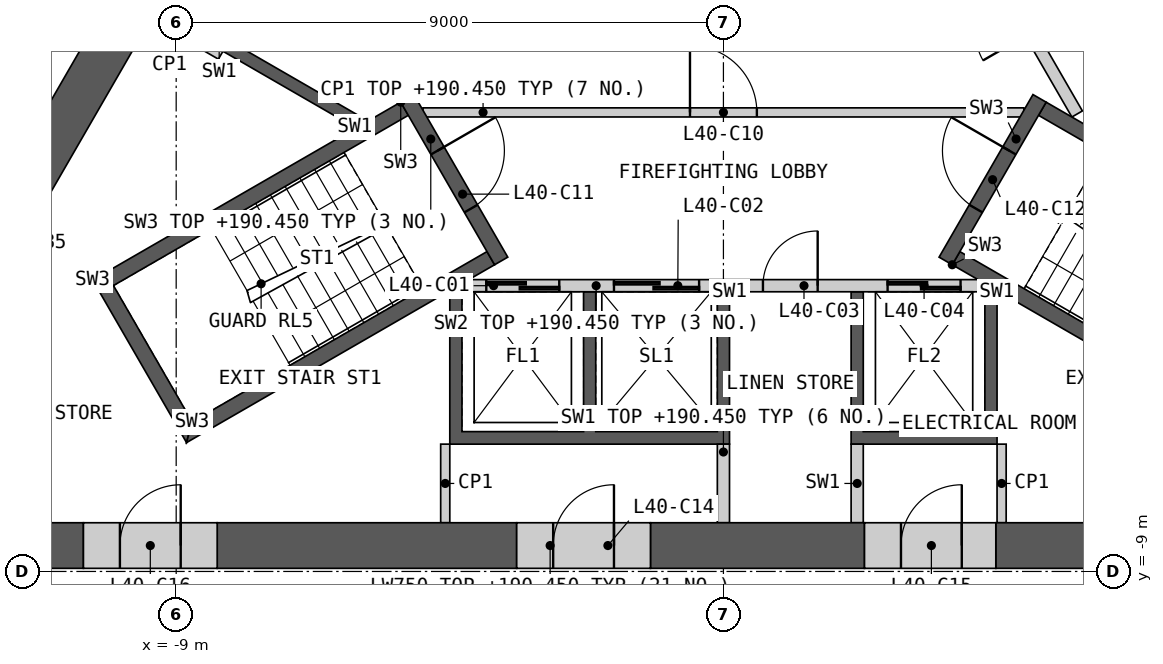
"""IFC4 building model, lengths in metres.
Left out: names, types, materials, properties, quantities, classifications, styles, units other than length and angle.
Written with IfcOpenShell. Run it as: python <this file> out.ifc"""

import sys

from ifc_helpers import new_model, si_unit, direction, frame, frame_2d, origin, place, context, subcontext, project, spatial, polyline, rectangle, outline, extrude, element, fill, save


model = new_model("IFC4")
c1 = context("Model", 3, precision=1e-05, world=origin(), true_north=direction((0.0, 1.0)))
c2 = subcontext(c1, "Body", "Model", "MODEL_VIEW")
j1 = project(units=[si_unit("LENGTHUNIT", "METRE"), si_unit("PLANEANGLEUNIT", "RADIAN")], contexts=[c1])
p1 = place(None, origin())
s1 = spatial("IfcSite", under=j1, at=p1, CompositionType="ELEMENT")
p2 = place(p1, origin())
s2 = spatial("IfcBuilding", under=s1, at=p2, CompositionType="ELEMENT")
p3 = place(p2, frame((0.0, 0.0, 187.2)))
s3 = spatial("IfcBuildingStorey", under=s2, at=p3, CompositionType="ELEMENT", Elevation=187.2)
p4 = place(p3, origin())
e1 = element("IfcWall", 1, at=p4, inside=s3, PredefinedType="SHEAR", context=c2, shape_type="SweptSolid", body=[
    extrude(outline(polyline([(4.5, -4.4), (4.5, -6.906), (2.1, -6.906), (2.1, -4.4), (2.3, -4.4), (2.3, -6.7), (4.3, -6.7), (4.3, -4.4), (4.5, -4.4)])), origin(), (0.0, 0.0, 1.0), 3.25),
])
p5 = place(p3, origin())
e2 = element("IfcWall", 2, at=p5, inside=s3, PredefinedType="SHEAR", context=c2, shape_type="SweptSolid", body=[
    extrude(outline(polyline([(0.1, -4.4), (0.1, -6.906), (-4.5, -6.906), (-4.5, -4.4), (-4.3, -4.4), (-4.3, -6.7), (-2.3, -6.7), (-2.3, -4.4), (-2.1, -4.4), (-2.1, -6.7), (-0.1, -6.7), (-0.1, -4.4), (0.1, -4.4)])), origin(), (0.0, 0.0, 1.0), 3.25),
])
p6 = place(p3, frame((-4.187, -4.3, 0.0), z_axis=(0.0, 0.0, 1.0), x_axis=(1.0, 0.0, 0.0)))
e3 = element("IfcWall", 3, at=p6, inside=s3, PredefinedType="SOLIDWALL", context=c2, shape_type="SweptSolid", body=[
    extrude(rectangle(XDim=8.373, YDim=0.2, at=frame_2d((4.187, 0.0))), origin(), (0.0, 0.0, 1.0), 3.25),
])
p7 = place(p6, frame((0.287, 0.0, 0.0)))
e4 = element("IfcOpeningElement", 4, at=p7, cuts=e3, PredefinedType="OPENING", context=c2, shape_type="SweptSolid", body=[
    extrude(rectangle(XDim=1.2, YDim=2.1, at=frame_2d((0.6, 1.05))), frame((0.0, 0.11, 0.0), z_axis=(0.0, -1.0, 0.0), x_axis=(1.0, 0.0, 0.0)), (0.0, 0.0, 1.0), 0.22),
])
p8 = place(p6, frame((2.387, 0.0, 0.0)))
e5 = element("IfcOpeningElement", 5, at=p8, cuts=e3, PredefinedType="OPENING", context=c2, shape_type="SweptSolid", body=[
    extrude(rectangle(XDim=1.4, YDim=2.1, at=frame_2d((0.7, 1.05))), frame((0.0, 0.11, 0.0), z_axis=(0.0, -1.0, 0.0), x_axis=(1.0, 0.0, 0.0)), (0.0, 0.0, 1.0), 0.22),
])
p9 = place(p6, frame((4.837, 0.0, 0.0)))
e6 = element("IfcOpeningElement", 6, at=p9, cuts=e3, PredefinedType="OPENING", context=c2, shape_type="SweptSolid", body=[
    extrude(rectangle(XDim=0.9, YDim=2.1, at=frame_2d((0.45, 1.05))), frame((0.0, 0.11, 0.0), z_axis=(0.0, -1.0, 0.0), x_axis=(1.0, 0.0, 0.0)), (0.0, 0.0, 1.0), 0.22),
])
p10 = place(p6, frame((6.887, 0.0, 0.0)))
e7 = element("IfcOpeningElement", 7, at=p10, cuts=e3, PredefinedType="OPENING", context=c2, shape_type="SweptSolid", body=[
    extrude(rectangle(XDim=1.2, YDim=2.1, at=frame_2d((0.6, 1.05))), frame((0.0, 0.11, 0.0), z_axis=(0.0, -1.0, 0.0), x_axis=(1.0, 0.0, 0.0)), (0.0, 0.0, 1.0), 0.22),
])
for number, where, z_axis, x_axis in (
    (8, (0.0, -6.906, 0.0), (0.0, 0.0, 1.0), (0.0, -1.0, 0.0)),
    (9, (2.2, -6.906, 0.0), (0.0, 0.0, 1.0), (0.0, -1.0, 0.0)),
):
    element("IfcWall", number, at=place(p3, frame(where, z_axis=z_axis, x_axis=x_axis)), inside=s3, PredefinedType="SHEAR", context=c2, shape_type="SweptSolid", body=[
        extrude(rectangle(XDim=1.293, YDim=0.2, at=frame_2d((0.646, 0.0))), origin(), (0.0, 0.0, 1.0), 3.25),
    ])
p11 = place(p3, origin())
e10 = element("IfcWall", 10, at=p11, inside=s3, PredefinedType="SHEAR", context=c2, shape_type="SweptSolid", body=[
    extrude(outline(polyline([(3.76, 2.287), (5.931, 3.54), (8.231, -0.444), (6.061, -1.697), (5.96, -1.524), (7.952, -0.374), (5.852, 3.263), (3.861, 2.113), (3.76, 2.287)])), origin(), (0.0, 0.0, 1.0), 3.25),
])
p12 = place(p3, frame((5.817, -1.476, 0.0), z_axis=(0.0, 0.0, 1.0), x_axis=(-0.500002616675, 0.866023893041, 0.0)))
e11 = element("IfcWall", 11, at=p12, inside=s3, PredefinedType="SOLIDWALL", context=c2, shape_type="SweptSolid", body=[
    extrude(rectangle(XDim=8.373, YDim=0.2, at=frame_2d((4.187, 0.0))), origin(), (0.0, 0.0, 1.0), 3.25),
])
p13 = place(p12, frame((1.537, 0.0, 0.0)))
e12 = element("IfcOpeningElement", 12, at=p13, cuts=e11, PredefinedType="OPENING", context=c2, shape_type="SweptSolid", body=[
    extrude(rectangle(XDim=0.9, YDim=2.1, at=frame_2d((0.45, 1.05))), frame((0.0, 0.11, 0.0), z_axis=(0.0, -1.0, 0.0), x_axis=(1.0, 0.0, 0.0)), (0.0, 0.0, 1.0), 0.22),
])
p14 = place(p12, frame((4.837, 0.0, 0.0)))
e13 = element("IfcOpeningElement", 13, at=p14, cuts=e11, PredefinedType="OPENING", context=c2, shape_type="SweptSolid", body=[
    extrude(rectangle(XDim=0.9, YDim=2.1, at=frame_2d((0.45, 1.05))), frame((0.0, 0.11, 0.0), z_axis=(0.0, -1.0, 0.0), x_axis=(1.0, 0.0, 0.0)), (0.0, 0.0, 1.0), 0.22),
])
p15 = place(p12, frame((6.937, 0.0, 0.0)))
e14 = element("IfcOpeningElement", 14, at=p15, cuts=e11, PredefinedType="OPENING", context=c2, shape_type="SweptSolid", body=[
    extrude(rectangle(XDim=1.1, YDim=2.1, at=frame_2d((0.55, 1.05))), frame((0.0, 0.11, 0.0), z_axis=(0.0, -1.0, 0.0), x_axis=(1.0, 0.0, 0.0)), (0.0, 0.0, 1.0), 0.22),
])
p16 = place(p3, origin())
e15 = element("IfcWall", 15, at=p16, inside=s3, PredefinedType="SHEAR", context=c2, shape_type="SweptSolid", body=[
    extrude(outline(polyline([(-6.061, -1.697), (-8.231, -0.444), (-8.131, -0.271), (-5.96, -1.524), (-6.061, -1.697)])), origin(), (0.0, 0.0, 1.0), 3.25),
])
p17 = place(p3, frame((-4.941, -1.45, 0.0), z_axis=(0.0, 0.0, 1.0), x_axis=(1.0, 0.0, 0.0)))
e16 = element("IfcWall", 16, at=p17, inside=s3, PredefinedType="PARTITIONING", context=c2, shape_type="SweptSolid", body=[
    extrude(rectangle(XDim=9.882, YDim=0.15, at=frame_2d((4.941, 0.0))), origin(), (0.0, 0.0, 1.0), 3.25),
])
p18 = place(p17, frame((4.391, 0.0, 0.0)))
e17 = element("IfcOpeningElement", 17, at=p18, cuts=e16, PredefinedType="OPENING", context=c2, shape_type="SweptSolid", body=[
    extrude(rectangle(XDim=1.1, YDim=2.1, at=frame_2d((0.55, 1.05))), frame((0.0, 0.085, 0.0), z_axis=(0.0, -1.0, 0.0), x_axis=(1.0, 0.0, 0.0)), (0.0, 0.0, 1.0), 0.17),
])
p19 = place(p3, origin())
e18 = element("IfcWall", 18, at=p19, inside=s3, PredefinedType="SHEAR", context=c2, shape_type="SweptSolid", body=[
    extrude(outline(polyline([(-5.307, -1.281), (-10.374, -4.206), (-10.032, -4.298), (-5.182, -1.498), (-5.307, -1.281)])), origin(), (0.0, 0.0, 1.0), 3.25),
])
p20 = place(p3, origin())
e19 = element("IfcWall", 19, at=p20, inside=s3, PredefinedType="SHEAR", context=c2, shape_type="SweptSolid", body=[
    extrude(outline(polyline([(-10.374, -4.206), (-8.83, -6.881), (-8.738, -6.539), (-10.032, -4.298), (-10.374, -4.206)])), origin(), (0.0, 0.0, 1.0), 3.25),
])
p21 = place(p3, origin())
e20 = element("IfcWall", 20, at=p21, inside=s3, PredefinedType="SHEAR", context=c2, shape_type="SweptSolid", body=[
    extrude(outline(polyline([(-8.738, -6.539), (-8.83, -6.881), (-3.763, -3.956), (-3.888, -3.739), (-8.738, -6.539)])), origin(), (0.0, 0.0, 1.0), 3.25),
])
p22 = place(p3, frame((-5.199, -1.219, 0.0), z_axis=(0.0, 0.0, 1.0), x_axis=(0.499982516597, -0.866035497597, 0.0)))
e21 = element("IfcWall", 21, at=p22, inside=s3, PredefinedType="SHEAR", context=c2, shape_type="SweptSolid", body=[
    extrude(rectangle(XDim=3.088, YDim=0.25, at=frame_2d((1.544, 0.0))), origin(), (0.0, 0.0, 1.0), 3.25),
])
p23 = place(p22, frame((0.994, 0.0, 0.0)))
e22 = element("IfcOpeningElement", 22, at=p23, cuts=e21, PredefinedType="OPENING", context=c2, shape_type="SweptSolid", body=[
    extrude(rectangle(XDim=1.1, YDim=2.1, at=frame_2d((0.55, 1.05))), frame((0.0, 0.135, 0.0), z_axis=(0.0, -1.0, 0.0), x_axis=(1.0, 0.0, 0.0)), (0.0, 0.0, 1.0), 0.27),
])
p24 = place(p3, origin())
e23 = element("IfcWall", 23, at=p24, inside=s3, PredefinedType="SHEAR", context=c2, shape_type="SweptSolid", body=[
    extrude(outline(polyline([(3.763, -3.956), (8.83, -6.881), (8.738, -6.539), (3.888, -3.739), (3.763, -3.956)])), origin(), (0.0, 0.0, 1.0), 3.25),
])
p25 = place(p3, origin())
e24 = element("IfcWall", 24, at=p25, inside=s3, PredefinedType="SHEAR", context=c2, shape_type="SweptSolid", body=[
    extrude(outline(polyline([(10.032, -4.298), (10.374, -4.206), (5.307, -1.281), (5.182, -1.498), (10.032, -4.298)])), origin(), (0.0, 0.0, 1.0), 3.25),
])
p26 = place(p3, frame((3.655, -3.893, 0.0), z_axis=(0.0, 0.0, 1.0), x_axis=(0.499982516597, 0.866035497597, 0.0)))
e25 = element("IfcWall", 25, at=p26, inside=s3, PredefinedType="SHEAR", context=c2, shape_type="SweptSolid", body=[
    extrude(rectangle(XDim=3.088, YDim=0.25, at=frame_2d((1.544, 0.0))), origin(), (0.0, 0.0, 1.0), 3.25),
])
p27 = place(p26, frame((0.994, 0.0, 0.0)))
e26 = element("IfcOpeningElement", 26, at=p27, cuts=e25, PredefinedType="OPENING", context=c2, shape_type="SweptSolid", body=[
    extrude(rectangle(XDim=1.1, YDim=2.1, at=frame_2d((0.55, 1.05))), frame((0.0, 0.135, 0.0), z_axis=(0.0, -1.0, 0.0), x_axis=(1.0, 0.0, 0.0)), (0.0, 0.0, 1.0), 0.27),
])
for number, where, z_axis, x_axis in (
    (27, (4.575, -6.906, 0.0), (0.0, 0.0, 1.0), (0.0, -1.0, 0.0)),
    (28, (-4.575, -6.906, 0.0), (0.0, 0.0, 1.0), (0.0, -1.0, 0.0)),
    (29, (-8.268, -0.509, 0.0), (0.0, 0.0, 1.0), (-0.866, 0.5, 0.0)),
):
    element("IfcWall", number, at=place(p3, frame(where, z_axis=z_axis, x_axis=x_axis)), inside=s3, PredefinedType="PARTITIONING", context=c2, shape_type="SweptSolid", body=[
        extrude(rectangle(XDim=1.293, YDim=0.15, at=frame_2d((0.646, 0.0))), origin(), (0.0, 0.0, 1.0), 3.25),
    ])
p28 = place(p3, frame((4.48, -8.574, 0.0), z_axis=(0.0, 0.0, 1.0), x_axis=(1.0, 0.0, 0.0)))
e30 = element("IfcWall", 30, at=p28, inside=s3, PredefinedType="SHEAR", context=c2, shape_type="SweptSolid", body=[
    extrude(rectangle(XDim=9.721, YDim=0.75, at=frame_2d((4.86, 0.0))), origin(), (0.0, 0.0, 1.0), 3.25),
])
p29 = place(p3, frame((-8.325, -8.574, 0.0), z_axis=(0.0, 0.0, 1.0), x_axis=(1.0, 0.0, 0.0)))
e31 = element("IfcWall", 31, at=p29, inside=s3, PredefinedType="SHEAR", context=c2, shape_type="SweptSolid", body=[
    extrude(rectangle(XDim=4.926, YDim=0.75, at=frame_2d((2.463, 0.0))), origin(), (0.0, 0.0, 1.0), 3.25),
])
p30 = place(p3, frame((-14.201, -8.574, 0.0), z_axis=(0.0, 0.0, 1.0), x_axis=(1.0, 0.0, 0.0)))
e32 = element("IfcWall", 32, at=p30, inside=s3, PredefinedType="SHEAR", context=c2, shape_type="SweptSolid", body=[
    extrude(rectangle(XDim=3.676, YDim=0.75, at=frame_2d((1.838, 0.0))), origin(), (0.0, 0.0, 1.0), 3.25),
])
p31 = place(p3, frame((-1.2, -8.574, 0.0), z_axis=(0.0, 0.0, 1.0), x_axis=(1.0, 0.0, 0.0)))
e33 = element("IfcWall", 33, at=p31, inside=s3, PredefinedType="SHEAR", context=c2, shape_type="SweptSolid", body=[
    extrude(rectangle(XDim=3.52, YDim=0.75, at=frame_2d((1.76, 0.0))), origin(), (0.0, 0.0, 1.0), 3.25),
])
p32 = place(p3, frame((-9.625, 0.477, 0.0), z_axis=(0.0, 0.0, 1.0), x_axis=(-0.499986234705, -0.866033351035, 0.0)))
e34 = element("IfcWall", 34, at=p32, inside=s3, PredefinedType="SHEAR", context=c2, shape_type="SweptSolid", body=[
    extrude(rectangle(XDim=9.801, YDim=0.75, at=frame_2d((4.9, 0.0))), origin(), (0.0, 0.0, 1.0), 3.25),
])
p33 = place(p3, frame((-3.4, -8.574, 0.0), z_axis=(0.0, 0.0, 1.0), x_axis=(1.0, 0.0, 0.0)))
e35 = element("IfcWall", 35, at=p33, inside=s3, PredefinedType="SHEAR", context=c2, shape_type="SweptSolid", body=[
    extrude(rectangle(XDim=2.2, YDim=0.75, at=frame_2d((1.1, 0.0))), origin(), (0.0, 0.0, 1.0), 3.25),
])
p34 = place(p33, frame((0.6, 0.0, 0.0)))
e36 = element("IfcOpeningElement", 36, at=p34, cuts=e35, PredefinedType="OPENING", context=c2, shape_type="SweptSolid", body=[
    extrude(rectangle(XDim=1.0, YDim=2.1, at=frame_2d((0.5, 1.05))), frame((0.0, 0.385, 0.0), z_axis=(0.0, -1.0, 0.0), x_axis=(1.0, 0.0, 0.0)), (0.0, 0.0, 1.0), 0.77),
])
p35 = place(p3, frame((2.32, -8.574, 0.0), z_axis=(0.0, 0.0, 1.0), x_axis=(1.0, 0.0, 0.0)))
e37 = element("IfcWall", 37, at=p35, inside=s3, PredefinedType="SHEAR", context=c2, shape_type="SweptSolid", body=[
    extrude(rectangle(XDim=2.16, YDim=0.75, at=frame_2d((1.08, 0.0))), origin(), (0.0, 0.0, 1.0), 3.25),
])
p36 = place(p35, frame((0.6, 0.0, 0.0)))
e38 = element("IfcOpeningElement", 38, at=p36, cuts=e37, PredefinedType="OPENING", context=c2, shape_type="SweptSolid", body=[
    extrude(rectangle(XDim=1.0, YDim=2.1, at=frame_2d((0.5, 1.05))), frame((0.0, 0.385, 0.0), z_axis=(0.0, -1.0, 0.0), x_axis=(1.0, 0.0, 0.0)), (0.0, 0.0, 1.0), 0.77),
])
p37 = place(p3, frame((-10.525, -8.574, 0.0), z_axis=(0.0, 0.0, 1.0), x_axis=(1.0, 0.0, 0.0)))
e39 = element("IfcWall", 39, at=p37, inside=s3, PredefinedType="SHEAR", context=c2, shape_type="SweptSolid", body=[
    extrude(rectangle(XDim=2.2, YDim=0.75, at=frame_2d((1.1, 0.0))), origin(), (0.0, 0.0, 1.0), 3.25),
])
p38 = place(p37, frame((0.6, 0.0, 0.0)))
e40 = element("IfcOpeningElement", 40, at=p38, cuts=e39, PredefinedType="OPENING", context=c2, shape_type="SweptSolid", body=[
    extrude(rectangle(XDim=1.0, YDim=2.1, at=frame_2d((0.5, 1.05))), frame((0.0, 0.385, 0.0), z_axis=(0.0, -1.0, 0.0), x_axis=(1.0, 0.0, 0.0)), (0.0, 0.0, 1.0), 0.77),
])
p39 = place(p3, frame((5.377, 19.385, 0.0), z_axis=(0.0, 0.0, 1.0), x_axis=(0.500000757641, -0.86602496636, 0.0)))
e41 = element("IfcWall", 41, at=p39, inside=s3, PredefinedType="PARTITIONING", context=c2, shape_type="SweptSolid", body=[
    extrude(rectangle(XDim=28.198, YDim=0.2, at=frame_2d((14.099, 0.0))), origin(), (0.0, 0.0, 1.0), 3.25),
])
p40 = place(p39, frame((22.735, 0.0, 0.0)))
e42 = element("IfcOpeningElement", 42, at=p40, cuts=e41, PredefinedType="OPENING", context=c2, shape_type="SweptSolid", body=[
    extrude(rectangle(XDim=1.8, YDim=2.1, at=frame_2d((0.9, 1.05))), frame((0.0, 0.11, 0.0), z_axis=(0.0, -1.0, 0.0), x_axis=(1.0, 0.0, 0.0)), (0.0, 0.0, 1.0), 0.22),
])
p41 = place(p39, frame((14.402, 0.0, 0.0)))
e43 = element("IfcOpeningElement", 43, at=p41, cuts=e41, PredefinedType="OPENING", context=c2, shape_type="SweptSolid", body=[
    extrude(rectangle(XDim=1.0, YDim=2.1, at=frame_2d((0.5, 1.05))), frame((0.0, 0.11, 0.0), z_axis=(0.0, -1.0, 0.0), x_axis=(1.0, 0.0, 0.0)), (0.0, 0.0, 1.0), 0.22),
])
p42 = place(p39, frame((12.796, 0.0, 0.0)))
e44 = element("IfcOpeningElement", 44, at=p42, cuts=e41, PredefinedType="OPENING", context=c2, shape_type="SweptSolid", body=[
    extrude(rectangle(XDim=1.0, YDim=2.1, at=frame_2d((0.5, 1.05))), frame((0.0, 0.11, 0.0), z_axis=(0.0, -1.0, 0.0), x_axis=(1.0, 0.0, 0.0)), (0.0, 0.0, 1.0), 0.22),
])
p43 = place(p39, frame((4.164, 0.0, 0.0)))
e45 = element("IfcOpeningElement", 45, at=p43, cuts=e41, PredefinedType="OPENING", context=c2, shape_type="SweptSolid", body=[
    extrude(rectangle(XDim=1.0, YDim=2.1, at=frame_2d((0.5, 1.05))), frame((0.0, 0.11, 0.0), z_axis=(0.0, -1.0, 0.0), x_axis=(1.0, 0.0, 0.0)), (0.0, 0.0, 1.0), 0.22),
])
p44 = place(p39, frame((1.452, 0.0, 0.0)))
e46 = element("IfcOpeningElement", 46, at=p44, cuts=e41, PredefinedType="OPENING", context=c2, shape_type="SweptSolid", body=[
    extrude(rectangle(XDim=0.95, YDim=2.1, at=frame_2d((0.475, 1.05))), frame((0.0, 0.11, 0.0), z_axis=(0.0, -1.0, 0.0), x_axis=(1.0, 0.0, 0.0)), (0.0, 0.0, 1.0), 0.22),
])
p45 = place(p3, frame((-14.619, -2.624, 0.0), z_axis=(0.0, 0.0, 1.0), x_axis=(0.50000393355, 0.866023132736, 0.0)))
e47 = element("IfcWall", 47, at=p45, inside=s3, PredefinedType="PARTITIONING", context=c2, shape_type="SweptSolid", body=[
    extrude(rectangle(XDim=9.335, YDim=0.2, at=frame_2d((4.667, 0.0))), origin(), (0.0, 0.0, 1.0), 3.25),
])
p46 = place(p45, frame((4.77, 0.0, 0.0)))
e48 = element("IfcOpeningElement", 48, at=p46, cuts=e47, PredefinedType="OPENING", context=c2, shape_type="SweptSolid", body=[
    extrude(rectangle(XDim=1.0, YDim=2.1, at=frame_2d((0.5, 1.05))), frame((0.0, 0.11, 0.0), z_axis=(0.0, -1.0, 0.0), x_axis=(1.0, 0.0, 0.0)), (0.0, 0.0, 1.0), 0.22),
])
p47 = place(p45, frame((3.163, 0.0, 0.0)))
e49 = element("IfcOpeningElement", 49, at=p47, cuts=e47, PredefinedType="OPENING", context=c2, shape_type="SweptSolid", body=[
    extrude(rectangle(XDim=1.0, YDim=2.1, at=frame_2d((0.5, 1.05))), frame((0.0, 0.11, 0.0), z_axis=(0.0, -1.0, 0.0), x_axis=(1.0, 0.0, 0.0)), (0.0, 0.0, 1.0), 0.22),
])
p48 = place(p7, origin())
e50 = element("IfcDoor", 50, at=p48, inside=s3, OperationType="SLIDING_TO_LEFT", PredefinedType="DOOR", context=c2, shape_type="SweptSolid", body=[
    extrude(rectangle(XDim=1.2, YDim=2.1, at=frame_2d((0.6, 1.05))), frame((0.0, 0.025, 0.0), z_axis=(0.0, -1.0, 0.0), x_axis=(1.0, 0.0, 0.0)), (0.0, 0.0, 1.0), 0.05),
])
fill(e4, e50)
p49 = place(p8, origin())
e51 = element("IfcDoor", 51, at=p49, inside=s3, OperationType="SLIDING_TO_LEFT", PredefinedType="DOOR", context=c2, shape_type="SweptSolid", body=[
    extrude(rectangle(XDim=1.4, YDim=2.1, at=frame_2d((0.7, 1.05))), frame((0.0, 0.025, 0.0), z_axis=(0.0, -1.0, 0.0), x_axis=(1.0, 0.0, 0.0)), (0.0, 0.0, 1.0), 0.05),
])
fill(e5, e51)
p50 = place(p9, origin())
e52 = element("IfcDoor", 52, at=p50, inside=s3, OperationType="SINGLE_SWING_RIGHT", PredefinedType="DOOR", context=c2, shape_type="SweptSolid", body=[
    extrude(rectangle(XDim=0.9, YDim=2.1, at=frame_2d((0.45, 1.05))), frame((0.0, 0.025, 0.0), z_axis=(0.0, -1.0, 0.0), x_axis=(1.0, 0.0, 0.0)), (0.0, 0.0, 1.0), 0.05),
])
fill(e6, e52)
p51 = place(p10, origin())
e53 = element("IfcDoor", 53, at=p51, inside=s3, OperationType="SLIDING_TO_LEFT", PredefinedType="DOOR", context=c2, shape_type="SweptSolid", body=[
    extrude(rectangle(XDim=1.2, YDim=2.1, at=frame_2d((0.6, 1.05))), frame((0.0, 0.025, 0.0), z_axis=(0.0, -1.0, 0.0), x_axis=(1.0, 0.0, 0.0)), (0.0, 0.0, 1.0), 0.05),
])
fill(e7, e53)
p52 = place(p18, origin())
e54 = element("IfcDoor", 54, at=p52, inside=s3, OperationType="SINGLE_SWING_LEFT", PredefinedType="DOOR", context=c2, shape_type="SweptSolid", body=[
    extrude(rectangle(XDim=1.1, YDim=2.1, at=frame_2d((0.55, 1.05))), frame((0.0, 0.025, 0.0), z_axis=(0.0, -1.0, 0.0), x_axis=(1.0, 0.0, 0.0)), (0.0, 0.0, 1.0), 0.05),
])
fill(e17, e54)
p53 = place(p23, origin())
e55 = element("IfcDoor", 55, at=p53, inside=s3, OperationType="SINGLE_SWING_LEFT", PredefinedType="DOOR", context=c2, shape_type="SweptSolid", body=[
    extrude(rectangle(XDim=1.1, YDim=2.1, at=frame_2d((0.55, 1.05))), frame((0.0, 0.025, 0.0), z_axis=(0.0, -1.0, 0.0), x_axis=(1.0, 0.0, 0.0)), (0.0, 0.0, 1.0), 0.05),
])
fill(e22, e55)
p54 = place(p27, origin())
e56 = element("IfcDoor", 56, at=p54, inside=s3, OperationType="SINGLE_SWING_RIGHT", PredefinedType="DOOR", context=c2, shape_type="SweptSolid", body=[
    extrude(rectangle(XDim=1.1, YDim=2.1, at=frame_2d((0.55, 1.05))), frame((0.0, 0.025, 0.0), z_axis=(0.0, -1.0, 0.0), x_axis=(1.0, 0.0, 0.0)), (0.0, 0.0, 1.0), 0.05),
])
fill(e26, e56)
p55 = place(p34, origin())
e57 = element("IfcDoor", 57, at=p55, inside=s3, OperationType="SINGLE_SWING_RIGHT", PredefinedType="DOOR", context=c2, shape_type="SweptSolid", body=[
    extrude(rectangle(XDim=1.0, YDim=2.1, at=frame_2d((0.5, 1.05))), frame((0.0, 0.13, 0.0), z_axis=(0.0, -1.0, 0.0), x_axis=(1.0, 0.0, 0.0)), (0.0, 0.0, 1.0), 0.05),
])
fill(e36, e57)
p56 = place(p36, origin())
e58 = element("IfcDoor", 58, at=p56, inside=s3, OperationType="SINGLE_SWING_RIGHT", PredefinedType="DOOR", context=c2, shape_type="SweptSolid", body=[
    extrude(rectangle(XDim=1.0, YDim=2.1, at=frame_2d((0.5, 1.05))), frame((0.0, 0.13, 0.0), z_axis=(0.0, -1.0, 0.0), x_axis=(1.0, 0.0, 0.0)), (0.0, 0.0, 1.0), 0.05),
])
fill(e38, e58)
p57 = place(p38, origin())
e59 = element("IfcDoor", 59, at=p57, inside=s3, OperationType="SINGLE_SWING_RIGHT", PredefinedType="DOOR", context=c2, shape_type="SweptSolid", body=[
    extrude(rectangle(XDim=1.0, YDim=2.1, at=frame_2d((0.5, 1.05))), frame((0.0, 0.13, 0.0), z_axis=(0.0, -1.0, 0.0), x_axis=(1.0, 0.0, 0.0)), (0.0, 0.0, 1.0), 0.05),
])
fill(e40, e59)
save(model, sys.argv[1])
